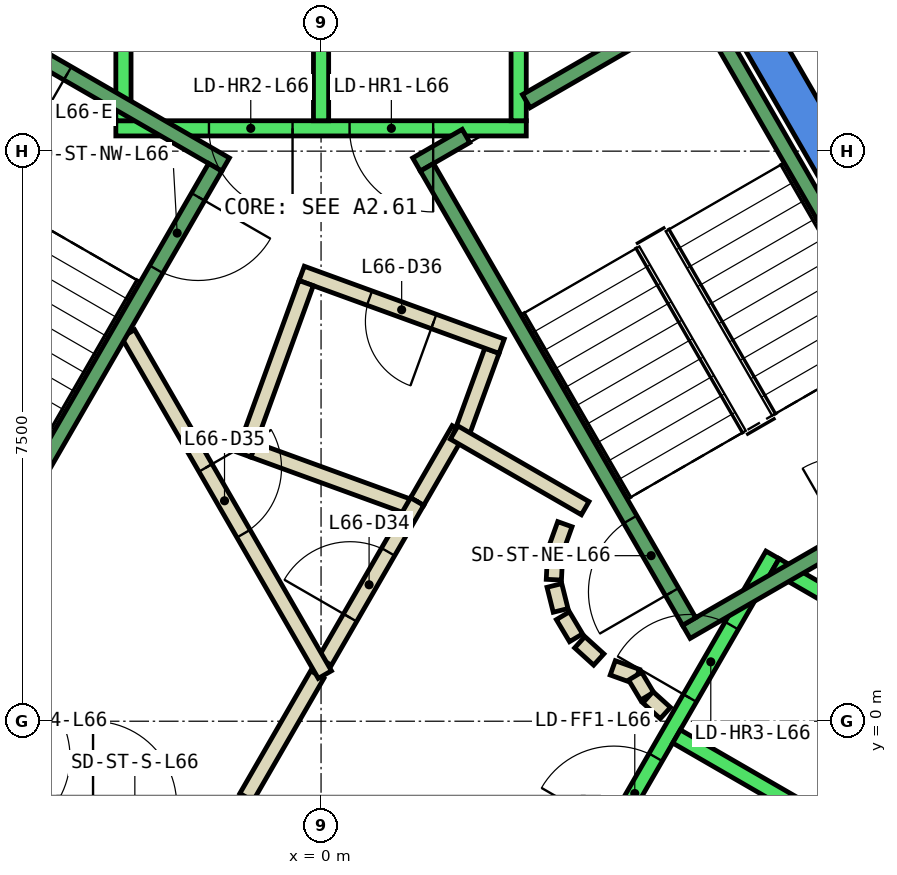
"""IFC4 building model, lengths in metres.
Left out: names, types, materials, properties, quantities, classifications, styles, units other than length and angle.
Written with IfcOpenShell. Run it as: python <this file> out.ifc"""

import sys

from ifc_helpers import new_model, si_unit, direction, frame, frame_2d, origin, place, context, subcontext, project, spatial, polyline, rectangle, outline, extrude, element, fill, save


model = new_model("IFC4")
c1 = context("Model", 3, precision=1e-05, world=origin(), true_north=direction((0.0, 1.0)))
c2 = subcontext(c1, "Body", "Model", "MODEL_VIEW")
j1 = project(units=[si_unit("LENGTHUNIT", "METRE"), si_unit("PLANEANGLEUNIT", "RADIAN")], contexts=[c1])
p1 = place(None, origin())
s1 = spatial("IfcSite", under=j1, at=p1, CompositionType="ELEMENT")
p2 = place(p1, origin())
s2 = spatial("IfcBuilding", under=s1, at=p2, CompositionType="ELEMENT")
p3 = place(p2, frame((0.0, 0.0, 286.4)))
s3 = spatial("IfcBuildingStorey", under=s2, at=p3, CompositionType="ELEMENT", Elevation=286.4)
p4 = place(p3, frame((0.0, 0.0, -0.6)))
e1 = element("IfcWall", 1, at=p4, inside=s3, PredefinedType="SHEAR", context=c2, shape_type="SweptSolid", body=[
    extrude(outline(polyline([(5.486, 9.998), (5.053, 9.748), (9.238, 2.5), (9.815, 2.5), (5.486, 9.998)])), origin(), (0.0, 0.0, 1.0), 3.86),
])
p5 = place(p3, frame((0.0, 0.0, -0.6)))
e2 = element("IfcWall", 2, at=p5, inside=s3, PredefinedType="SHEAR", context=c2, shape_type="SweptSolid", body=[
    extrude(outline(polyline([(4.907, -6.0), (9.815, 2.5), (9.238, 2.5), (4.619, -5.5), (4.907, -6.0)])), origin(), (0.0, 0.0, 1.0), 3.86),
])
p6 = place(p3, frame((1.264, 2.89, 0.0), z_axis=(0.0, 0.0, 1.0), x_axis=(0.500043792738, 0.866000118559, 0.0)))
e3 = element("IfcWall", 3, at=p6, inside=s3, PredefinedType="PARTITIONING", context=c2, shape_type="SweptSolid", body=[
    extrude(rectangle(XDim=1.096, YDim=0.2, at=frame_2d((0.548, 0.0))), origin(), (0.0, 0.0, 1.0), 3.26),
])
p7 = place(p3, frame((1.838, 3.748, 0.0), z_axis=(0.0, 0.0, 1.0), x_axis=(0.342266462435, 0.939602931398, 0.0)))
e4 = element("IfcWall", 4, at=p7, inside=s3, PredefinedType="PARTITIONING", context=c2, shape_type="SweptSolid", body=[
    extrude(rectangle(XDim=1.198, YDim=0.2, at=frame_2d((0.599, 0.0))), origin(), (0.0, 0.0, 1.0), 3.26),
])
p8 = place(p3, frame((2.376, 4.934, 0.0), z_axis=(0.0, 0.0, 1.0), x_axis=(-0.939640574808, 0.342163104635, 0.0)))
e5 = element("IfcWall", 5, at=p8, inside=s3, PredefinedType="PARTITIONING", context=c2, shape_type="SweptSolid", body=[
    extrude(rectangle(XDim=2.8, YDim=0.2, at=frame_2d((1.4, 0.0))), origin(), (0.0, 0.0, 1.0), 3.26),
])
p9 = place(p8, frame((0.95, 0.0, 0.0)))
e6 = element("IfcOpeningElement", 6, at=p9, cuts=e5, PredefinedType="OPENING", context=c2, shape_type="SweptSolid", body=[
    extrude(rectangle(XDim=0.9, YDim=2.1, at=frame_2d((0.45, 1.05))), frame((0.0, 0.11, 0.0), z_axis=(0.0, -1.0, 0.0), x_axis=(1.0, 0.0, 0.0)), (0.0, 0.0, 1.0), 0.22),
])
p10 = place(p3, frame((-0.196, 5.764, 0.0), z_axis=(0.0, 0.0, 1.0), x_axis=(-0.34165322761, -0.939826086073, 0.0)))
e7 = element("IfcWall", 7, at=p10, inside=s3, PredefinedType="PARTITIONING", context=c2, shape_type="SweptSolid", body=[
    extrude(rectangle(XDim=2.4, YDim=0.2, at=frame_2d((1.2, 0.0))), origin(), (0.0, 0.0, 1.0), 3.26),
])
p11 = place(p3, frame((-0.888, 3.568, 0.0), z_axis=(0.0, 0.0, 1.0), x_axis=(0.939685034098, -0.34204098686, 0.0)))
e8 = element("IfcWall", 8, at=p11, inside=s3, PredefinedType="PARTITIONING", context=c2, shape_type="SweptSolid", body=[
    extrude(rectangle(XDim=2.237, YDim=0.2, at=frame_2d((1.119, 0.0))), origin(), (0.0, 0.0, 1.0), 3.26),
])
p12 = place(p3, frame((-0.982, -1.0, 0.0), z_axis=(0.0, 0.0, 1.0), x_axis=(0.50024047865, 0.865886518847, 0.0)))
e9 = element("IfcWall", 9, at=p12, inside=s3, PredefinedType="PARTITIONING", context=c2, shape_type="SweptSolid", body=[
    extrude(rectangle(XDim=1.863, YDim=0.2, at=frame_2d((0.931, 0.0))), origin(), (0.0, 0.0, 1.0), 3.26),
])
p13 = place(p3, frame((0.05, 0.787, 0.0), z_axis=(0.0, 0.0, 1.0), x_axis=(0.499945861543, 0.866056658381, 0.0)))
e10 = element("IfcWall", 10, at=p13, inside=s3, PredefinedType="PARTITIONING", context=c2, shape_type="SweptSolid", body=[
    extrude(rectangle(XDim=2.428, YDim=0.2, at=frame_2d((1.214, 0.0))), origin(), (0.0, 0.0, 1.0), 3.26),
])
p14 = place(p13, frame((0.664, 0.0, 0.0)))
e11 = element("IfcOpeningElement", 11, at=p14, cuts=e10, PredefinedType="OPENING", context=c2, shape_type="SweptSolid", body=[
    extrude(rectangle(XDim=1.0, YDim=2.1, at=frame_2d((0.5, 1.05))), frame((0.0, 0.11, 0.0), z_axis=(0.0, -1.0, 0.0), x_axis=(1.0, 0.0, 0.0)), (0.0, 0.0, 1.0), 0.22),
])
p15 = place(p3, frame((1.751, 3.798, 0.0), z_axis=(0.0, 0.0, 1.0), x_axis=(0.866091650241, -0.499885240213, 0.0)))
e12 = element("IfcWall", 12, at=p15, inside=s3, PredefinedType="PARTITIONING", context=c2, shape_type="SweptSolid", body=[
    extrude(rectangle(XDim=1.991, YDim=0.2, at=frame_2d((0.995, 0.0))), origin(), (0.0, 0.0, 1.0), 3.26),
])
p16 = place(p3, frame((3.208, 2.592, 0.0), z_axis=(0.0, 0.0, 1.0), x_axis=(-0.337388820924, -0.941365382578, 0.0)))
e13 = element("IfcWall", 13, at=p16, inside=s3, PredefinedType="PARTITIONING", context=c2, shape_type="SweptSolid", body=[
    extrude(rectangle(XDim=0.338, YDim=0.2, at=frame_2d((0.169, 0.0))), origin(), (0.0, 0.0, 1.0), 3.26),
])
p17 = place(p3, frame((3.079, 2.199, 0.0), z_axis=(0.0, 0.0, 1.0), x_axis=(-0.047771483479, -0.998858290933, 0.0)))
e14 = element("IfcWall", 14, at=p17, inside=s3, PredefinedType="PARTITIONING", context=c2, shape_type="SweptSolid", body=[
    extrude(rectangle(XDim=0.337, YDim=0.2, at=frame_2d((0.169, 0.0))), origin(), (0.0, 0.0, 1.0), 3.26),
])
p18 = place(p3, frame((3.07, 1.786, 0.0), z_axis=(0.0, 0.0, 1.0), x_axis=(0.242705583207, -0.970099994784, 0.0)))
e15 = element("IfcWall", 15, at=p18, inside=s3, PredefinedType="PARTITIONING", context=c2, shape_type="SweptSolid", body=[
    extrude(rectangle(XDim=0.338, YDim=0.2, at=frame_2d((0.169, 0.0))), origin(), (0.0, 0.0, 1.0), 3.26),
])
for number, where, z_axis, x_axis in (
    (16, (3.182, 1.388, 0.0), (0.0, 0.0, 1.0), (0.512, -0.859, 0.0)),
    (17, (3.404, 1.039, 0.0), (0.0, 0.0, 1.0), (0.74, -0.672, 0.0)),
):
    element("IfcWall", number, at=place(p3, frame(where, z_axis=z_axis, x_axis=x_axis)), inside=s3, PredefinedType="PARTITIONING", context=c2, shape_type="SweptSolid", body=[
        extrude(rectangle(XDim=0.338, YDim=0.2, at=frame_2d((0.169, 0.0))), origin(), (0.0, 0.0, 1.0), 3.26),
    ])
p19 = place(p3, frame((3.838, 0.702, 0.0), z_axis=(0.0, 0.0, 1.0), x_axis=(0.941035081519, -0.338308993895, 0.0)))
e18 = element("IfcWall", 18, at=p19, inside=s3, PredefinedType="PARTITIONING", context=c2, shape_type="SweptSolid", body=[
    extrude(rectangle(XDim=0.337, YDim=0.2, at=frame_2d((0.168, 0.0))), origin(), (0.0, 0.0, 1.0), 3.26),
])
p20 = place(p3, frame((4.132, 0.593, 0.0), z_axis=(0.0, 0.0, 1.0), x_axis=(0.513561617048, -0.858052717201, 0.0)))
e19 = element("IfcWall", 19, at=p20, inside=s3, PredefinedType="PARTITIONING", context=c2, shape_type="SweptSolid", body=[
    extrude(rectangle(XDim=0.308, YDim=0.2, at=frame_2d((0.154, 0.0))), origin(), (0.0, 0.0, 1.0), 3.26),
])
p21 = place(p3, frame((4.301, 0.315, 0.0), z_axis=(0.0, 0.0, 1.0), x_axis=(0.741798017506, -0.670623367639, 0.0)))
e20 = element("IfcWall", 20, at=p21, inside=s3, PredefinedType="PARTITIONING", context=c2, shape_type="SweptSolid", body=[
    extrude(rectangle(XDim=0.309, YDim=0.2, at=frame_2d((0.154, 0.0))), origin(), (0.0, 0.0, 1.0), 3.26),
])
p22 = place(p3, frame((-2.54, 5.1, 0.0), z_axis=(0.0, 0.0, 1.0), x_axis=(0.499925051871, -0.866068670783, 0.0)))
e21 = element("IfcWall", 21, at=p22, inside=s3, PredefinedType="PARTITIONING", context=c2, shape_type="SweptSolid", body=[
    extrude(rectangle(XDim=5.181, YDim=0.2, at=frame_2d((2.59, 0.0))), origin(), (0.0, 0.0, 1.0), 3.26),
])
p23 = place(p22, frame((2.04, 0.0, 0.0)))
e22 = element("IfcOpeningElement", 22, at=p23, cuts=e21, PredefinedType="OPENING", context=c2, shape_type="SweptSolid", body=[
    extrude(rectangle(XDim=1.0, YDim=2.1, at=frame_2d((0.5, 1.05))), frame((0.0, 0.11, 0.0), z_axis=(0.0, -1.0, 0.0), x_axis=(1.0, 0.0, 0.0)), (0.0, 0.0, 1.0), 0.22),
])
p24 = place(p3, frame((2.7, 7.8, 0.0), z_axis=(0.0, 0.0, 1.0), x_axis=(-1.0, 0.0, 0.0)))
e23 = element("IfcWall", 23, at=p24, inside=s3, PredefinedType="STANDARD", context=c2, shape_type="SweptSolid", body=[
    extrude(rectangle(XDim=5.4, YDim=0.2, at=frame_2d((2.7, 0.0))), origin(), (0.0, 0.0, 1.0), 3.26),
])
p25 = place(p24, frame((1.225, 0.0, 0.0)))
e24 = element("IfcOpeningElement", 24, at=p25, cuts=e23, PredefinedType="OPENING", context=c2, shape_type="SweptSolid", body=[
    extrude(rectangle(XDim=1.1, YDim=2.1, at=frame_2d((0.55, 1.05))), frame((0.0, 0.11, 0.0), z_axis=(0.0, -1.0, 0.0), x_axis=(1.0, 0.0, 0.0)), (0.0, 0.0, 1.0), 0.22),
])
p26 = place(p24, frame((3.075, 0.0, 0.0)))
e25 = element("IfcOpeningElement", 25, at=p26, cuts=e23, PredefinedType="OPENING", context=c2, shape_type="SweptSolid", body=[
    extrude(rectangle(XDim=1.1, YDim=2.1, at=frame_2d((0.55, 1.05))), frame((0.0, 0.11, 0.0), z_axis=(0.0, -1.0, 0.0), x_axis=(1.0, 0.0, 0.0)), (0.0, 0.0, 1.0), 0.22),
])
for number, where, z_axis, x_axis in (
    (26, (2.6, 7.9, 0.0), (0.0, 0.0, 1.0), (0.0, 1.0, 0.0)),
    (27, (0.0, 7.9, 0.0), (0.0, 0.0, 1.0), (0.0, 1.0, 0.0)),
    (28, (-2.6, 7.9, 0.0), (0.0, 0.0, 1.0), (0.0, 1.0, 0.0)),
):
    element("IfcWall", number, at=place(p3, frame(where, z_axis=z_axis, x_axis=x_axis)), inside=s3, PredefinedType="STANDARD", context=c2, shape_type="SweptSolid", body=[
        extrude(rectangle(XDim=2.4, YDim=0.2, at=frame_2d((1.2, 0.0))), origin(), (0.0, 0.0, 1.0), 3.26),
    ])
p27 = place(p3, frame((-5.94, 2.188, 0.0), z_axis=(0.0, 0.0, 1.0), x_axis=(0.500034260056, -0.866005622828, 0.0)))
e29 = element("IfcWall", 29, at=p27, inside=s3, PredefinedType="STANDARD", context=c2, shape_type="SweptSolid", body=[
    extrude(rectangle(XDim=5.399, YDim=0.2, at=frame_2d((2.7, 0.0))), origin(), (0.0, 0.0, 1.0), 3.26),
])
p28 = place(p27, frame((3.075, 0.0, 0.0)))
e30 = element("IfcOpeningElement", 30, at=p28, cuts=e29, PredefinedType="OPENING", context=c2, shape_type="SweptSolid", body=[
    extrude(rectangle(XDim=1.1, YDim=2.1, at=frame_2d((0.55, 1.05))), frame((0.0, 0.11, 0.0), z_axis=(0.0, -1.0, 0.0), x_axis=(1.0, 0.0, 0.0)), (0.0, 0.0, 1.0), 0.22),
])
p29 = place(p27, frame((1.225, 0.0, 0.0)))
e31 = element("IfcOpeningElement", 31, at=p29, cuts=e29, PredefinedType="OPENING", context=c2, shape_type="SweptSolid", body=[
    extrude(rectangle(XDim=1.1, YDim=2.1, at=frame_2d((0.55, 1.05))), frame((0.0, 0.11, 0.0), z_axis=(0.0, -1.0, 0.0), x_axis=(1.0, 0.0, 0.0)), (0.0, 0.0, 1.0), 0.22),
])
p30 = place(p3, frame((3.24, -2.488, 0.0), z_axis=(0.0, 0.0, 1.0), x_axis=(0.500034260056, 0.866005622828, 0.0)))
e32 = element("IfcWall", 32, at=p30, inside=s3, PredefinedType="STANDARD", context=c2, shape_type="SweptSolid", body=[
    extrude(rectangle(XDim=5.399, YDim=0.2, at=frame_2d((2.7, 0.0))), origin(), (0.0, 0.0, 1.0), 3.26),
])
p31 = place(p30, frame((3.225, 0.0, 0.0)))
e33 = element("IfcOpeningElement", 33, at=p31, cuts=e32, PredefinedType="OPENING", context=c2, shape_type="SweptSolid", body=[
    extrude(rectangle(XDim=1.1, YDim=2.1, at=frame_2d((0.55, 1.05))), frame((0.0, 0.11, 0.0), z_axis=(0.0, -1.0, 0.0), x_axis=(1.0, 0.0, 0.0)), (0.0, 0.0, 1.0), 0.22),
])
p32 = place(p30, frame((1.225, 0.0, 0.0)))
e34 = element("IfcOpeningElement", 34, at=p32, cuts=e32, PredefinedType="OPENING", context=c2, shape_type="SweptSolid", body=[
    extrude(rectangle(XDim=1.1, YDim=2.1, at=frame_2d((0.55, 1.05))), frame((0.0, 0.11, 0.0), z_axis=(0.0, -1.0, 0.0), x_axis=(1.0, 0.0, 0.0)), (0.0, 0.0, 1.0), 0.22),
])
p33 = place(p3, frame((5.492, -3.788, 0.0), z_axis=(0.0, 0.0, 1.0), x_axis=(0.500034260056, 0.866005622828, 0.0)))
e35 = element("IfcWall", 35, at=p33, inside=s3, PredefinedType="STANDARD", context=c2, shape_type="SweptSolid", body=[
    extrude(rectangle(XDim=5.399, YDim=0.2, at=frame_2d((2.7, 0.0))), origin(), (0.0, 0.0, 1.0), 3.26),
])
for number, where, z_axis, x_axis in (
    (36, (4.677, -0.2, 0.0), (0.0, 0.0, 1.0), (0.866, -0.5, 0.0)),
    (37, (5.977, 2.052, 0.0), (0.0, 0.0, 1.0), (0.866, -0.5, 0.0)),
):
    element("IfcWall", number, at=place(p3, frame(where, z_axis=z_axis, x_axis=x_axis)), inside=s3, PredefinedType="STANDARD", context=c2, shape_type="SweptSolid", body=[
        extrude(rectangle(XDim=2.399, YDim=0.2, at=frame_2d((1.2, 0.0))), origin(), (0.0, 0.0, 1.0), 3.26),
    ])
p34 = place(p3, frame((4.806, 1.176, 0.0), z_axis=(0.0, 0.0, 1.0), x_axis=(0.866059941101, 0.499940174841, 0.0)))
e38 = element("IfcWall", 38, at=p34, inside=s3, PredefinedType="STANDARD", context=c2, shape_type="SweptSolid", body=[
    extrude(rectangle(XDim=4.4, YDim=0.2, at=frame_2d((2.2, 0.0))), origin(), (0.0, 0.0, 1.0), 3.26),
])
p35 = place(p34, frame((2.4, 0.0, 0.0)))
e39 = element("IfcOpeningElement", 39, at=p35, cuts=e38, PredefinedType="OPENING", context=c2, shape_type="SweptSolid", body=[
    extrude(rectangle(XDim=1.1, YDim=2.2, at=frame_2d((0.55, 1.1))), frame((0.0, 0.11, 0.0), z_axis=(0.0, -1.0, 0.0), x_axis=(1.0, 0.0, 0.0)), (0.0, 0.0, 1.0), 0.22),
])
p36 = place(p3, frame((2.7, 8.158, 0.0), z_axis=(0.0, 0.0, 1.0), x_axis=(0.86611865017, 0.499838457731, 0.0)))
e40 = element("IfcWall", 40, at=p36, inside=s3, PredefinedType="STANDARD", context=c2, shape_type="SweptSolid", body=[
    extrude(rectangle(XDim=2.733, YDim=0.2, at=frame_2d((1.366, 0.0))), origin(), (0.0, 0.0, 1.0), 3.26),
])
p37 = place(p3, frame((1.256, 7.324, 0.0), z_axis=(0.0, 0.0, 1.0), x_axis=(0.865915093549, 0.500191014278, 0.0)))
e41 = element("IfcWall", 41, at=p37, inside=s3, PredefinedType="STANDARD", context=c2, shape_type="SweptSolid", body=[
    extrude(rectangle(XDim=0.752, YDim=0.2, at=frame_2d((0.376, 0.0))), origin(), (0.0, 0.0, 1.0), 3.26),
])
p38 = place(p3, frame((4.843, 1.312, 0.0), z_axis=(0.0, 0.0, 1.0), x_axis=(-0.499963383562, 0.866046543262, 0.0)))
e42 = element("IfcWall", 42, at=p38, inside=s3, PredefinedType="STANDARD", context=c2, shape_type="SweptSolid", body=[
    extrude(rectangle(XDim=6.9, YDim=0.2, at=frame_2d((3.45, 0.0))), origin(), (0.0, 0.0, 1.0), 3.26),
])
p39 = place(p38, frame((0.45, 0.0, 0.0)))
e43 = element("IfcOpeningElement", 43, at=p39, cuts=e42, PredefinedType="OPENING", context=c2, shape_type="SweptSolid", body=[
    extrude(rectangle(XDim=1.1, YDim=2.2, at=frame_2d((0.55, 1.1))), frame((0.0, 0.11, 0.0), z_axis=(0.0, -1.0, 0.0), x_axis=(1.0, 0.0, 0.0)), (0.0, 0.0, 1.0), 0.22),
])
p40 = place(p3, frame((8.48, 3.412, 0.0), z_axis=(0.0, 0.0, 1.0), x_axis=(-0.499978703459, 0.866037698999, 0.0)))
e44 = element("IfcWall", 44, at=p40, inside=s3, PredefinedType="STANDARD", context=c2, shape_type="SweptSolid", body=[
    extrude(rectangle(XDim=6.9, YDim=0.2, at=frame_2d((3.45, 0.0))), origin(), (0.0, 0.0, 1.0), 3.26),
])
p41 = place(p3, frame((-1.256, 7.324, 0.0), z_axis=(0.0, 0.0, 1.0), x_axis=(-0.866046073146, 0.499964197906, 0.0)))
e45 = element("IfcWall", 45, at=p41, inside=s3, PredefinedType="STANDARD", context=c2, shape_type="SweptSolid", body=[
    extrude(rectangle(XDim=4.4, YDim=0.2, at=frame_2d((2.2, 0.0))), origin(), (0.0, 0.0, 1.0), 3.26),
])
p42 = place(p41, frame((2.4, 0.0, 0.0)))
e46 = element("IfcOpeningElement", 46, at=p42, cuts=e45, PredefinedType="OPENING", context=c2, shape_type="SweptSolid", body=[
    extrude(rectangle(XDim=1.1, YDim=2.2, at=frame_2d((0.55, 1.1))), frame((0.0, 0.11, 0.0), z_axis=(0.0, -1.0, 0.0), x_axis=(1.0, 0.0, 0.0)), (0.0, 0.0, 1.0), 0.22),
])
p43 = place(p3, frame((-1.393, 7.288, 0.0), z_axis=(0.0, 0.0, 1.0), x_axis=(-0.499963383562, -0.866046543262, 0.0)))
e47 = element("IfcWall", 47, at=p43, inside=s3, PredefinedType="STANDARD", context=c2, shape_type="SweptSolid", body=[
    extrude(rectangle(XDim=6.9, YDim=0.2, at=frame_2d((3.45, 0.0))), origin(), (0.0, 0.0, 1.0), 3.26),
])
p44 = place(p43, frame((0.45, 0.0, 0.0)))
e48 = element("IfcOpeningElement", 48, at=p44, cuts=e47, PredefinedType="OPENING", context=c2, shape_type="SweptSolid", body=[
    extrude(rectangle(XDim=1.1, YDim=2.2, at=frame_2d((0.55, 1.1))), frame((0.0, 0.11, 0.0), z_axis=(0.0, -1.0, 0.0), x_axis=(1.0, 0.0, 0.0)), (0.0, 0.0, 1.0), 0.22),
])
p45 = place(p14, origin())
e49 = element("IfcDoor", 49, at=p45, inside=s3, OperationType="SINGLE_SWING_RIGHT", PredefinedType="DOOR", context=c2, shape_type="SweptSolid", body=[
    extrude(rectangle(XDim=1.0, YDim=2.1, at=frame_2d((0.5, 1.05))), frame((0.0, 0.025, 0.0), z_axis=(0.0, -1.0, 0.0), x_axis=(1.0, 0.0, 0.0)), (0.0, 0.0, 1.0), 0.05),
])
fill(e11, e49)
p46 = place(p23, origin())
e50 = element("IfcDoor", 50, at=p46, inside=s3, OperationType="SINGLE_SWING_RIGHT", PredefinedType="DOOR", context=c2, shape_type="SweptSolid", body=[
    extrude(rectangle(XDim=1.0, YDim=2.1, at=frame_2d((0.5, 1.05))), frame((0.0, 0.025, 0.0), z_axis=(0.0, -1.0, 0.0), x_axis=(1.0, 0.0, 0.0)), (0.0, 0.0, 1.0), 0.05),
])
fill(e22, e50)
p47 = place(p9, origin())
e51 = element("IfcDoor", 51, at=p47, inside=s3, OperationType="SINGLE_SWING_LEFT", PredefinedType="DOOR", context=c2, shape_type="SweptSolid", body=[
    extrude(rectangle(XDim=0.9, YDim=2.1, at=frame_2d((0.45, 1.05))), frame((0.0, 0.025, 0.0), z_axis=(0.0, -1.0, 0.0), x_axis=(1.0, 0.0, 0.0)), (0.0, 0.0, 1.0), 0.05),
])
fill(e6, e51)
p48 = place(p25, origin())
e52 = element("IfcDoor", 52, at=p48, inside=s3, OperationType="SLIDING_TO_LEFT", PredefinedType="DOOR", context=c2, shape_type="SweptSolid", body=[
    extrude(rectangle(XDim=1.1, YDim=2.1, at=frame_2d((0.55, 1.05))), frame((0.0, 0.025, 0.0), z_axis=(0.0, -1.0, 0.0), x_axis=(1.0, 0.0, 0.0)), (0.0, 0.0, 1.0), 0.05),
])
fill(e24, e52)
p49 = place(p26, origin())
e53 = element("IfcDoor", 53, at=p49, inside=s3, OperationType="SLIDING_TO_LEFT", PredefinedType="DOOR", context=c2, shape_type="SweptSolid", body=[
    extrude(rectangle(XDim=1.1, YDim=2.1, at=frame_2d((0.55, 1.05))), frame((0.0, 0.025, 0.0), z_axis=(0.0, -1.0, 0.0), x_axis=(1.0, 0.0, 0.0)), (0.0, 0.0, 1.0), 0.05),
])
fill(e25, e53)
p50 = place(p31, origin())
e54 = element("IfcDoor", 54, at=p50, inside=s3, OperationType="SLIDING_TO_LEFT", PredefinedType="DOOR", context=c2, shape_type="SweptSolid", body=[
    extrude(rectangle(XDim=1.1, YDim=2.1, at=frame_2d((0.55, 1.05))), frame((0.0, 0.025, 0.0), z_axis=(0.0, -1.0, 0.0), x_axis=(1.0, 0.0, 0.0)), (0.0, 0.0, 1.0), 0.05),
])
fill(e33, e54)
p51 = place(p32, origin())
e55 = element("IfcDoor", 55, at=p51, inside=s3, OperationType="SLIDING_TO_LEFT", PredefinedType="DOOR", context=c2, shape_type="SweptSolid", body=[
    extrude(rectangle(XDim=1.1, YDim=2.1, at=frame_2d((0.55, 1.05))), frame((0.0, 0.025, 0.0), z_axis=(0.0, -1.0, 0.0), x_axis=(1.0, 0.0, 0.0)), (0.0, 0.0, 1.0), 0.05),
])
fill(e34, e55)
p52 = place(p39, origin())
e56 = element("IfcDoor", 56, at=p52, inside=s3, OperationType="SINGLE_SWING_LEFT", PredefinedType="DOOR", context=c2, shape_type="SweptSolid", body=[
    extrude(rectangle(XDim=1.1, YDim=2.2, at=frame_2d((0.55, 1.1))), frame((0.0, 0.025, 0.0), z_axis=(0.0, -1.0, 0.0), x_axis=(1.0, 0.0, 0.0)), (0.0, 0.0, 1.0), 0.05),
])
fill(e43, e56)
p53 = place(p44, origin())
e57 = element("IfcDoor", 57, at=p53, inside=s3, OperationType="SINGLE_SWING_LEFT", PredefinedType="DOOR", context=c2, shape_type="SweptSolid", body=[
    extrude(rectangle(XDim=1.1, YDim=2.2, at=frame_2d((0.55, 1.1))), frame((0.0, 0.025, 0.0), z_axis=(0.0, -1.0, 0.0), x_axis=(1.0, 0.0, 0.0)), (0.0, 0.0, 1.0), 0.05),
])
fill(e48, e57)
p54 = place(p42, origin())
e58 = element("IfcDoor", 58, at=p54, inside=s3, OperationType="SINGLE_SWING_LEFT", PredefinedType="DOOR", context=c2, shape_type="SweptSolid", body=[
    extrude(rectangle(XDim=1.1, YDim=2.2, at=frame_2d((0.55, 1.1))), frame((0.0, 0.025, 0.0), z_axis=(0.0, -1.0, 0.0), x_axis=(1.0, 0.0, 0.0)), (0.0, 0.0, 1.0), 0.05),
])
fill(e46, e58)
save(model, sys.argv[1])
